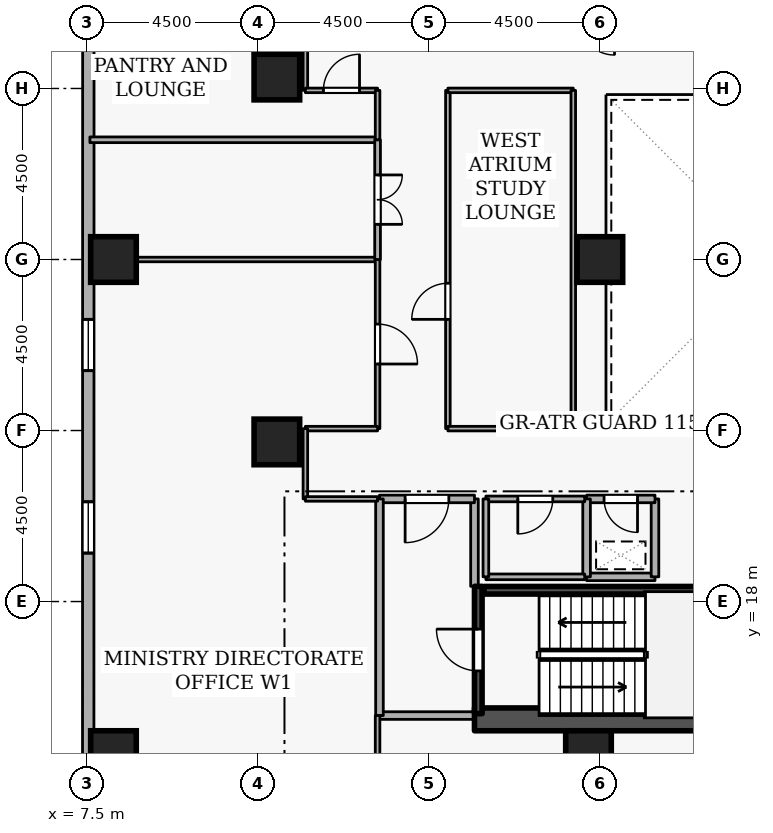
"""IFC4 building model, lengths in metres.
Left out: names, types, materials, properties, quantities, classifications, styles, units other than length and angle.
Written with IfcOpenShell. Run it as: python <this file> out.ifc"""

import sys

from ifc_helpers import new_model, si_unit, direction, frame, frame_2d, origin, origin_2d, place, context, subcontext, project, spatial, rectangle, extrude, element, fill, save


model = new_model("IFC4")
c1 = context("Model", 3, precision=1e-05, world=origin(), true_north=direction((0.0, 1.0)))
c2 = subcontext(c1, "Body", "Model", "MODEL_VIEW")
j1 = project(units=[si_unit("LENGTHUNIT", "METRE"), si_unit("PLANEANGLEUNIT", "RADIAN")], contexts=[c1])
p1 = place(None, origin())
s1 = spatial("IfcSite", under=j1, at=p1, CompositionType="ELEMENT")
p2 = place(p1, origin())
s2 = spatial("IfcBuilding", under=s1, at=p2, CompositionType="ELEMENT")
p3 = place(p2, frame((0.0, 0.0, 94.5)))
s3 = spatial("IfcBuildingStorey", under=s2, at=p3, CompositionType="ELEMENT", Elevation=94.5)
p4 = place(p3, frame((17.7, 14.9, 0.0), z_axis=(0.0, 0.0, 1.0), x_axis=(1.0, 0.0, 0.0)))
e1 = element("IfcWall", 1, at=p4, inside=s3, PredefinedType="SHEAR", context=c2, shape_type="SweptSolid", body=[
    extrude(rectangle(XDim=15.6, YDim=0.6, at=frame_2d((7.8, 0.0))), origin(), (0.0, 0.0, 1.0), 3.6),
])
for number, where, z_axis, x_axis in (
    (2, (8.2, 14.0, 0.0), (0.0, 0.0, 1.0), (1.0, 0.0, 0.0)),
    (3, (8.2, 27.0, 0.0), (0.0, 0.0, 1.0), (1.0, 0.0, 0.0)),
    (4, (12.5, 22.2, 0.0), (0.0, 0.0, 1.0), (1.0, 0.0, 0.0)),
    (5, (12.5, 31.8, 0.0), (0.0, 0.0, 1.0), (1.0, 0.0, 0.0)),
    (6, (20.7, 14.0, 0.0), (0.0, 0.0, 1.0), (1.0, 0.0, 0.0)),
    (7, (21.0, 27.0, 0.0), (0.0, 0.0, 1.0), (1.0, 0.0, 0.0)),
):
    element("IfcColumn", number, at=place(p3, frame(where, z_axis=z_axis, x_axis=x_axis)), inside=s3, PredefinedType="COLUMN", context=c2, shape_type="SweptSolid", body=[
        extrude(rectangle(XDim=1.2, YDim=1.2, at=origin_2d()), origin(), (0.0, 0.0, 1.0), 3.6),
    ])
p5 = place(p3, frame((7.542, 46.425, 0.0), z_axis=(0.0, 0.0, 1.0), x_axis=(-0.000182370391, -0.999999983371, 0.0)))
e8 = element("IfcWall", 8, at=p5, inside=s3, PredefinedType="STANDARD", context=c2, shape_type="SweptSolid", body=[
    extrude(rectangle(XDim=34.806, YDim=0.3, at=frame_2d((17.403, 0.0))), origin(), (0.0, 0.0, 1.0), 2.22),
])
p6 = place(p5, frame((1.8, 0.0, 0.72)))
e9 = element("IfcOpeningElement", 9, at=p6, cuts=e8, PredefinedType="OPENING", context=c2, shape_type="SweptSolid", body=[
    extrude(rectangle(XDim=1.35, YDim=1.05, at=frame_2d((0.675, 0.525))), frame((0.0, 0.16, 0.0), z_axis=(0.0, -1.0, 0.0), x_axis=(1.0, 0.0, 0.0)), (0.0, 0.0, 1.0), 0.32),
])
p7 = place(p5, frame((11.4, 0.0, 0.72)))
e10 = element("IfcOpeningElement", 10, at=p7, cuts=e8, PredefinedType="OPENING", context=c2, shape_type="SweptSolid", body=[
    extrude(rectangle(XDim=1.35, YDim=1.05, at=frame_2d((0.675, 0.525))), frame((0.0, 0.16, 0.0), z_axis=(0.0, -1.0, 0.0), x_axis=(1.0, 0.0, 0.0)), (0.0, 0.0, 1.0), 0.32),
])
p8 = place(p5, frame((21.0, 0.0, 0.72)))
e11 = element("IfcOpeningElement", 11, at=p8, cuts=e8, PredefinedType="OPENING", context=c2, shape_type="SweptSolid", body=[
    extrude(rectangle(XDim=1.35, YDim=1.05, at=frame_2d((0.675, 0.525))), frame((0.0, 0.16, 0.0), z_axis=(0.0, -1.0, 0.0), x_axis=(1.0, 0.0, 0.0)), (0.0, 0.0, 1.0), 0.32),
])
p9 = place(p5, frame((25.8, 0.0, 0.72)))
e12 = element("IfcOpeningElement", 12, at=p9, cuts=e8, PredefinedType="OPENING", context=c2, shape_type="SweptSolid", body=[
    extrude(rectangle(XDim=1.35, YDim=1.05, at=frame_2d((0.675, 0.525))), frame((0.0, 0.16, 0.0), z_axis=(0.0, -1.0, 0.0), x_axis=(1.0, 0.0, 0.0)), (0.0, 0.0, 1.0), 0.32),
])
p10 = place(p3, frame((17.8, 15.05, 0.0), z_axis=(0.0, 0.0, 1.0), x_axis=(0.0, 1.0, 0.0)))
e13 = element("IfcWall", 13, at=p10, inside=s3, PredefinedType="SHEAR", context=c2, shape_type="SweptSolid", body=[
    extrude(rectangle(XDim=3.35, YDim=0.2, at=frame_2d((1.675, 0.0))), origin(), (0.0, 0.0, 1.0), 3.6),
])
p11 = place(p10, frame((1.125, 0.0, 0.0)))
e14 = element("IfcOpeningElement", 14, at=p11, cuts=e13, PredefinedType="OPENING", context=c2, shape_type="SweptSolid", body=[
    extrude(rectangle(XDim=1.1, YDim=2.1, at=frame_2d((0.55, 1.05))), frame((0.0, 0.11, 0.0), z_axis=(0.0, -1.0, 0.0), x_axis=(1.0, 0.0, 0.0)), (0.0, 0.0, 1.0), 0.22),
])
p12 = place(p3, frame((25.05, 18.297, 0.0), z_axis=(0.0, 0.0, 1.0), x_axis=(-1.0, 0.0, 0.0)))
e15 = element("IfcWall", 15, at=p12, inside=s3, PredefinedType="SHEAR", context=c2, shape_type="SweptSolid", body=[
    extrude(rectangle(XDim=7.1, YDim=0.2, at=frame_2d((3.55, 0.0))), origin(), (0.0, 0.0, 1.0), 3.6),
])
p13 = place(p3, frame((15.2, 15.0, 0.0), z_axis=(0.0, 0.0, 1.0), x_axis=(1.0, 0.0, 0.0)))
e16 = element("IfcWall", 16, at=p13, inside=s3, PredefinedType="STANDARD", context=c2, shape_type="SweptSolid", body=[
    extrude(rectangle(XDim=2.5, YDim=0.2, at=frame_2d((1.25, 0.0))), origin(), (0.0, 0.0, 1.0), 3.3),
])
p14 = place(p3, frame((17.7, 18.4, 0.0), z_axis=(0.0, 0.0, 1.0), x_axis=(0.0, 1.0, 0.0)))
e17 = element("IfcWall", 17, at=p14, inside=s3, PredefinedType="STANDARD", context=c2, shape_type="SweptSolid", body=[
    extrude(rectangle(XDim=2.3, YDim=0.2, at=frame_2d((1.15, 0.0))), origin(), (0.0, 0.0, 1.0), 2.505),
])
p15 = place(p3, frame((17.7, 20.7, 0.0), z_axis=(0.0, 0.0, 1.0), x_axis=(-1.0, 0.0, 0.0)))
e18 = element("IfcWall", 18, at=p15, inside=s3, PredefinedType="STANDARD", context=c2, shape_type="SweptSolid", body=[
    extrude(rectangle(XDim=2.5, YDim=0.2, at=frame_2d((1.25, 0.0))), origin(), (0.0, 0.0, 1.0), 3.3),
])
p16 = place(p15, frame((0.675, 0.0, 0.0)))
e19 = element("IfcOpeningElement", 19, at=p16, cuts=e18, PredefinedType="OPENING", context=c2, shape_type="SweptSolid", body=[
    extrude(rectangle(XDim=1.15, YDim=2.1, at=frame_2d((0.575, 1.05))), frame((0.0, 0.11, 0.0), z_axis=(0.0, -1.0, 0.0), x_axis=(1.0, 0.0, 0.0)), (0.0, 0.0, 1.0), 0.22),
])
p17 = place(p3, frame((15.2, 20.7, 0.0), z_axis=(0.0, 0.0, 1.0), x_axis=(0.0, -1.0, 0.0)))
e20 = element("IfcWall", 20, at=p17, inside=s3, PredefinedType="STANDARD", context=c2, shape_type="SweptSolid", body=[
    extrude(rectangle(XDim=5.7, YDim=0.2, at=frame_2d((2.85, 0.0))), origin(), (0.0, 0.0, 1.0), 3.3),
])
p18 = place(p3, frame((20.65, 18.65, 0.0), z_axis=(0.0, 0.0, 1.0), x_axis=(1.0, 0.0, 0.0)))
e21 = element("IfcWall", 21, at=p18, inside=s3, PredefinedType="STANDARD", context=c2, shape_type="SweptSolid", body=[
    extrude(rectangle(XDim=1.8, YDim=0.2, at=frame_2d((0.9, 0.0))), origin(), (0.0, 0.0, 1.0), 3.3),
])
p19 = place(p3, frame((22.45, 18.65, 0.0), z_axis=(0.0, 0.0, 1.0), x_axis=(0.0, 1.0, 0.0)))
e22 = element("IfcWall", 22, at=p19, inside=s3, PredefinedType="STANDARD", context=c2, shape_type="SweptSolid", body=[
    extrude(rectangle(XDim=2.05, YDim=0.2, at=frame_2d((1.025, 0.0))), origin(), (0.0, 0.0, 1.0), 3.3),
])
p20 = place(p3, frame((22.45, 20.7, 0.0), z_axis=(0.0, 0.0, 1.0), x_axis=(-1.0, 0.0, 0.0)))
e23 = element("IfcWall", 23, at=p20, inside=s3, PredefinedType="STANDARD", context=c2, shape_type="SweptSolid", body=[
    extrude(rectangle(XDim=1.8, YDim=0.2, at=frame_2d((0.9, 0.0))), origin(), (0.0, 0.0, 1.0), 3.3),
])
p21 = place(p20, frame((0.46, 0.0, 0.0)))
e24 = element("IfcOpeningElement", 24, at=p21, cuts=e23, PredefinedType="OPENING", context=c2, shape_type="SweptSolid", body=[
    extrude(rectangle(XDim=0.88, YDim=2.04, at=frame_2d((0.44, 1.02))), frame((0.0, 0.11, 0.0), z_axis=(0.0, -1.0, 0.0), x_axis=(1.0, 0.0, 0.0)), (0.0, 0.0, 1.0), 0.22),
])
p22 = place(p3, frame((20.65, 20.7, 0.0), z_axis=(0.0, 0.0, 1.0), x_axis=(0.0, -1.0, 0.0)))
e25 = element("IfcWall", 25, at=p22, inside=s3, PredefinedType="STANDARD", context=c2, shape_type="SweptSolid", body=[
    extrude(rectangle(XDim=2.05, YDim=0.2, at=frame_2d((1.025, 0.0))), origin(), (0.0, 0.0, 1.0), 3.3),
])
p23 = place(p3, frame((18.0, 18.65, 0.0), z_axis=(0.0, 0.0, 1.0), x_axis=(1.0, 0.0, 0.0)))
e26 = element("IfcWall", 26, at=p23, inside=s3, PredefinedType="PARTITIONING", context=c2, shape_type="SweptSolid", body=[
    extrude(rectangle(XDim=2.6, YDim=0.15, at=frame_2d((1.3, 0.0))), origin(), (0.0, 0.0, 1.0), 3.3),
])
p24 = place(p3, frame((20.6, 20.7, 0.0), z_axis=(0.0, 0.0, 1.0), x_axis=(-1.0, 0.0, 0.0)))
e27 = element("IfcWall", 27, at=p24, inside=s3, PredefinedType="PARTITIONING", context=c2, shape_type="SweptSolid", body=[
    extrude(rectangle(XDim=2.6, YDim=0.15, at=frame_2d((1.3, 0.0))), origin(), (0.0, 0.0, 1.0), 3.3),
])
p25 = place(p24, frame((0.84, 0.0, 0.0)))
e28 = element("IfcOpeningElement", 28, at=p25, cuts=e27, PredefinedType="OPENING", context=c2, shape_type="SweptSolid", body=[
    extrude(rectangle(XDim=0.92, YDim=2.08, at=frame_2d((0.46, 1.04))), frame((0.0, 0.085, 0.0), z_axis=(0.0, -1.0, 0.0), x_axis=(1.0, 0.0, 0.0)), (0.0, 0.0, 1.0), 0.17),
])
p26 = place(p3, frame((18.0, 20.7, 0.0), z_axis=(0.0, 0.0, 1.0), x_axis=(0.0, -1.0, 0.0)))
e29 = element("IfcWall", 29, at=p26, inside=s3, PredefinedType="PARTITIONING", context=c2, shape_type="SweptSolid", body=[
    extrude(rectangle(XDim=2.05, YDim=0.15, at=frame_2d((1.025, 0.0))), origin(), (0.0, 0.0, 1.0), 2.505),
])
p27 = place(p3, frame((7.58, 27.0, 0.0), z_axis=(0.0, 0.0, 1.0), x_axis=(1.0, 0.0, 0.0)))
e30 = element("IfcWall", 30, at=p27, inside=s3, PredefinedType="PARTITIONING", context=c2, shape_type="SweptSolid", body=[
    extrude(rectangle(XDim=7.57, YDim=0.12, at=frame_2d((3.785, 0.0))), origin(), (0.0, 0.0, 1.0), 1.685),
])
p28 = place(p3, frame((15.15, 27.0, 0.0), z_axis=(0.0, 0.0, 1.0), x_axis=(0.0, -1.0, 0.0)))
e31 = element("IfcWall", 31, at=p28, inside=s3, PredefinedType="PARTITIONING", context=c2, shape_type="SweptSolid", body=[
    extrude(rectangle(XDim=4.45, YDim=0.12, at=frame_2d((2.225, 0.0))), origin(), (0.0, 0.0, 1.0), 3.3),
])
p29 = place(p28, frame((1.7, 0.0, 0.0)))
e32 = element("IfcOpeningElement", 32, at=p29, cuts=e31, PredefinedType="OPENING", context=c2, shape_type="SweptSolid", body=[
    extrude(rectangle(XDim=1.05, YDim=2.1, at=frame_2d((0.525, 1.05))), frame((0.0, 0.07, 0.0), z_axis=(0.0, -1.0, 0.0), x_axis=(1.0, 0.0, 0.0)), (0.0, 0.0, 1.0), 0.14),
])
p30 = place(p3, frame((15.15, 22.55, 0.0), z_axis=(0.0, 0.0, 1.0), x_axis=(-1.0, 0.0, 0.0)))
e33 = element("IfcWall", 33, at=p30, inside=s3, PredefinedType="PARTITIONING", context=c2, shape_type="SweptSolid", body=[
    extrude(rectangle(XDim=1.9, YDim=0.12, at=frame_2d((0.95, 0.0))), origin(), (0.0, 0.0, 1.0), 3.3),
])
p31 = place(p3, frame((13.25, 22.55, 0.0), z_axis=(0.0, 0.0, 1.0), x_axis=(0.0, -1.0, 0.0)))
e34 = element("IfcWall", 34, at=p31, inside=s3, PredefinedType="PARTITIONING", context=c2, shape_type="SweptSolid", body=[
    extrude(rectangle(XDim=1.85, YDim=0.12, at=frame_2d((0.925, 0.0))), origin(), (0.0, 0.0, 1.0), 3.3),
])
p32 = place(p3, frame((13.25, 20.7, 0.0), z_axis=(0.0, 0.0, 1.0), x_axis=(1.0, 0.0, 0.0)))
e35 = element("IfcWall", 35, at=p32, inside=s3, PredefinedType="PARTITIONING", context=c2, shape_type="SweptSolid", body=[
    extrude(rectangle(XDim=1.9, YDim=0.12, at=frame_2d((0.95, 0.0))), origin(), (0.0, 0.0, 1.0), 3.3),
])
p33 = place(p3, frame((15.15, 15.0, 0.0), z_axis=(0.0, 0.0, 1.0), x_axis=(0.0, -1.0, 0.0)))
e36 = element("IfcWall", 36, at=p33, inside=s3, PredefinedType="PARTITIONING", context=c2, shape_type="SweptSolid", body=[
    extrude(rectangle(XDim=5.92, YDim=0.12, at=frame_2d((2.96, 0.0))), origin(), (0.0, 0.0, 1.0), 3.3),
])
p34 = place(p3, frame((7.58, 30.15, 0.0), z_axis=(0.0, 0.0, 1.0), x_axis=(1.0, 0.0, 0.0)))
e37 = element("IfcWall", 37, at=p34, inside=s3, PredefinedType="PARTITIONING", context=c2, shape_type="SweptSolid", body=[
    extrude(rectangle(XDim=7.57, YDim=0.15, at=frame_2d((3.785, 0.0))), origin(), (0.0, 0.0, 1.0), 3.3),
])
p35 = place(p3, frame((15.15, 30.15, 0.0), z_axis=(0.0, 0.0, 1.0), x_axis=(0.0, -1.0, 0.0)))
e38 = element("IfcWall", 38, at=p35, inside=s3, PredefinedType="PARTITIONING", context=c2, shape_type="SweptSolid", body=[
    extrude(rectangle(XDim=3.15, YDim=0.15, at=frame_2d((1.575, 0.0))), origin(), (0.0, 0.0, 1.0), 3.3),
])
p36 = place(p35, frame((0.925, 0.0, 0.0)))
e39 = element("IfcOpeningElement", 39, at=p36, cuts=e38, PredefinedType="OPENING", context=c2, shape_type="SweptSolid", body=[
    extrude(rectangle(XDim=1.3, YDim=2.12, at=frame_2d((0.65, 1.06))), frame((0.0, 0.085, 0.0), z_axis=(0.0, -1.0, 0.0), x_axis=(1.0, 0.0, 0.0)), (0.0, 0.0, 1.0), 0.17),
])
p37 = place(p3, frame((13.25, 33.3, 0.0), z_axis=(0.0, 0.0, 1.0), x_axis=(0.0, -1.0, 0.0)))
e40 = element("IfcWall", 40, at=p37, inside=s3, PredefinedType="PARTITIONING", context=c2, shape_type="SweptSolid", body=[
    extrude(rectangle(XDim=1.85, YDim=0.12, at=frame_2d((0.925, 0.0))), origin(), (0.0, 0.0, 1.0), 3.3),
])
p38 = place(p3, frame((13.25, 31.45, 0.0), z_axis=(0.0, 0.0, 1.0), x_axis=(1.0, 0.0, 0.0)))
e41 = element("IfcWall", 41, at=p38, inside=s3, PredefinedType="PARTITIONING", context=c2, shape_type="SweptSolid", body=[
    extrude(rectangle(XDim=1.9, YDim=0.12, at=frame_2d((0.95, 0.0))), origin(), (0.0, 0.0, 1.0), 3.3),
])
p39 = place(p38, frame((0.475, 0.0, 0.0)))
e42 = element("IfcOpeningElement", 42, at=p39, cuts=e41, PredefinedType="OPENING", context=c2, shape_type="SweptSolid", body=[
    extrude(rectangle(XDim=0.95, YDim=2.1, at=frame_2d((0.475, 1.05))), frame((0.0, 0.07, 0.0), z_axis=(0.0, -1.0, 0.0), x_axis=(1.0, 0.0, 0.0)), (0.0, 0.0, 1.0), 0.14),
])
p40 = place(p3, frame((15.15, 31.45, 0.0), z_axis=(0.0, 0.0, 1.0), x_axis=(0.0, -1.0, 0.0)))
e43 = element("IfcWall", 43, at=p40, inside=s3, PredefinedType="PARTITIONING", context=c2, shape_type="SweptSolid", body=[
    extrude(rectangle(XDim=1.3, YDim=0.12, at=frame_2d((0.65, 0.0))), origin(), (0.0, 0.0, 1.0), 3.3),
])
p41 = place(p3, frame((17.0, 22.55, 0.0), z_axis=(0.0, 0.0, 1.0), x_axis=(0.0, 1.0, 0.0)))
e44 = element("IfcWall", 44, at=p41, inside=s3, PredefinedType="PARTITIONING", context=c2, shape_type="SweptSolid", body=[
    extrude(rectangle(XDim=8.9, YDim=0.12, at=frame_2d((4.45, 0.0))), origin(), (0.0, 0.0, 1.0), 3.3),
])
p42 = place(p41, frame((2.875, 0.0, 0.0)))
e45 = element("IfcOpeningElement", 45, at=p42, cuts=e44, PredefinedType="OPENING", context=c2, shape_type="SweptSolid", body=[
    extrude(rectangle(XDim=0.95, YDim=2.1, at=frame_2d((0.475, 1.05))), frame((0.0, 0.07, 0.0), z_axis=(0.0, -1.0, 0.0), x_axis=(1.0, 0.0, 0.0)), (0.0, 0.0, 1.0), 0.14),
])
p43 = place(p3, frame((17.0, 31.45, 0.0), z_axis=(0.0, 0.0, 1.0), x_axis=(1.0, 0.0, 0.0)))
e46 = element("IfcWall", 46, at=p43, inside=s3, PredefinedType="PARTITIONING", context=c2, shape_type="SweptSolid", body=[
    extrude(rectangle(XDim=3.3, YDim=0.12, at=frame_2d((1.65, 0.0))), origin(), (0.0, 0.0, 1.0), 3.3),
])
p44 = place(p3, frame((20.3, 31.45, 0.0), z_axis=(0.0, 0.0, 1.0), x_axis=(0.0, -1.0, 0.0)))
e47 = element("IfcWall", 47, at=p44, inside=s3, PredefinedType="PARTITIONING", context=c2, shape_type="SweptSolid", body=[
    extrude(rectangle(XDim=8.9, YDim=0.12, at=frame_2d((4.45, 0.0))), origin(), (0.0, 0.0, 1.0), 3.3),
])
p45 = place(p3, frame((20.3, 22.55, 0.0), z_axis=(0.0, 0.0, 1.0), x_axis=(-1.0, 0.0, 0.0)))
e48 = element("IfcWall", 48, at=p45, inside=s3, PredefinedType="PARTITIONING", context=c2, shape_type="SweptSolid", body=[
    extrude(rectangle(XDim=3.3, YDim=0.12, at=frame_2d((1.65, 0.0))), origin(), (0.0, 0.0, 1.0), 3.3),
])
p46 = place(p8, origin())
e49 = element("IfcWindow", 49, at=p46, inside=s3, PartitioningType="SINGLE_PANEL", PredefinedType="WINDOW", context=c2, shape_type="SweptSolid", body=[
    extrude(rectangle(XDim=1.35, YDim=1.05, at=frame_2d((0.675, 0.525))), frame((0.0, 0.03, 0.0), z_axis=(0.0, -1.0, 0.0), x_axis=(1.0, 0.0, 0.0)), (0.0, 0.0, 1.0), 0.06),
])
fill(e11, e49)
p47 = place(p9, origin())
e50 = element("IfcWindow", 50, at=p47, inside=s3, PartitioningType="SINGLE_PANEL", PredefinedType="WINDOW", context=c2, shape_type="SweptSolid", body=[
    extrude(rectangle(XDim=1.35, YDim=1.05, at=frame_2d((0.675, 0.525))), frame((0.0, 0.03, 0.0), z_axis=(0.0, -1.0, 0.0), x_axis=(1.0, 0.0, 0.0)), (0.0, 0.0, 1.0), 0.06),
])
fill(e12, e50)
p48 = place(p11, origin())
e51 = element("IfcDoor", 51, at=p48, inside=s3, OperationType="SINGLE_SWING_RIGHT", PredefinedType="DOOR", context=c2, shape_type="SweptSolid", body=[
    extrude(rectangle(XDim=1.1, YDim=2.1, at=frame_2d((0.55, 1.05))), frame((0.0, 0.025, 0.0), z_axis=(0.0, -1.0, 0.0), x_axis=(1.0, 0.0, 0.0)), (0.0, 0.0, 1.0), 0.05),
])
fill(e14, e51)
p49 = place(p16, origin())
e52 = element("IfcDoor", 52, at=p49, inside=s3, OperationType="SINGLE_SWING_RIGHT", PredefinedType="DOOR", context=c2, shape_type="SweptSolid", body=[
    extrude(rectangle(XDim=1.15, YDim=2.1, at=frame_2d((0.575, 1.05))), frame((0.0, 0.025, 0.0), z_axis=(0.0, -1.0, 0.0), x_axis=(1.0, 0.0, 0.0)), (0.0, 0.0, 1.0), 0.05),
])
fill(e19, e52)
p50 = place(p21, origin())
e53 = element("IfcDoor", 53, at=p50, inside=s3, OperationType="SINGLE_SWING_LEFT", PredefinedType="DOOR", context=c2, shape_type="SweptSolid", body=[
    extrude(rectangle(XDim=0.88, YDim=2.04, at=frame_2d((0.44, 1.02))), frame((0.0, 0.025, 0.0), z_axis=(0.0, -1.0, 0.0), x_axis=(1.0, 0.0, 0.0)), (0.0, 0.0, 1.0), 0.05),
])
fill(e24, e53)
p51 = place(p25, origin())
e54 = element("IfcDoor", 54, at=p51, inside=s3, OperationType="SINGLE_SWING_RIGHT", PredefinedType="DOOR", context=c2, shape_type="SweptSolid", body=[
    extrude(rectangle(XDim=0.92, YDim=2.08, at=frame_2d((0.46, 1.04))), frame((0.0, 0.025, 0.0), z_axis=(0.0, -1.0, 0.0), x_axis=(1.0, 0.0, 0.0)), (0.0, 0.0, 1.0), 0.05),
])
fill(e28, e54)
p52 = place(p29, origin())
e55 = element("IfcDoor", 55, at=p52, inside=s3, OperationType="SINGLE_SWING_RIGHT", PredefinedType="DOOR", context=c2, shape_type="SweptSolid", body=[
    extrude(rectangle(XDim=1.05, YDim=2.1, at=frame_2d((0.525, 1.05))), frame((0.0, 0.025, 0.0), z_axis=(0.0, -1.0, 0.0), x_axis=(1.0, 0.0, 0.0)), (0.0, 0.0, 1.0), 0.05),
])
fill(e32, e55)
p53 = place(p36, origin())
e56 = element("IfcDoor", 56, at=p53, inside=s3, OperationType="DOUBLE_DOOR_SINGLE_SWING", PredefinedType="DOOR", context=c2, shape_type="SweptSolid", body=[
    extrude(rectangle(XDim=1.3, YDim=2.12, at=frame_2d((0.65, 1.06))), frame((0.0, 0.025, 0.0), z_axis=(0.0, -1.0, 0.0), x_axis=(1.0, 0.0, 0.0)), (0.0, 0.0, 1.0), 0.05),
])
fill(e39, e56)
p54 = place(p39, origin())
e57 = element("IfcDoor", 57, at=p54, inside=s3, OperationType="SINGLE_SWING_RIGHT", PredefinedType="DOOR", context=c2, shape_type="SweptSolid", body=[
    extrude(rectangle(XDim=0.95, YDim=2.1, at=frame_2d((0.475, 1.05))), frame((0.0, 0.025, 0.0), z_axis=(0.0, -1.0, 0.0), x_axis=(1.0, 0.0, 0.0)), (0.0, 0.0, 1.0), 0.05),
])
fill(e42, e57)
p55 = place(p42, origin())
e58 = element("IfcDoor", 58, at=p55, inside=s3, OperationType="SINGLE_SWING_LEFT", PredefinedType="DOOR", context=c2, shape_type="SweptSolid", body=[
    extrude(rectangle(XDim=0.95, YDim=2.1, at=frame_2d((0.475, 1.05))), frame((0.0, 0.025, 0.0), z_axis=(0.0, -1.0, 0.0), x_axis=(1.0, 0.0, 0.0)), (0.0, 0.0, 1.0), 0.05),
])
fill(e45, e58)
save(model, sys.argv[1])
